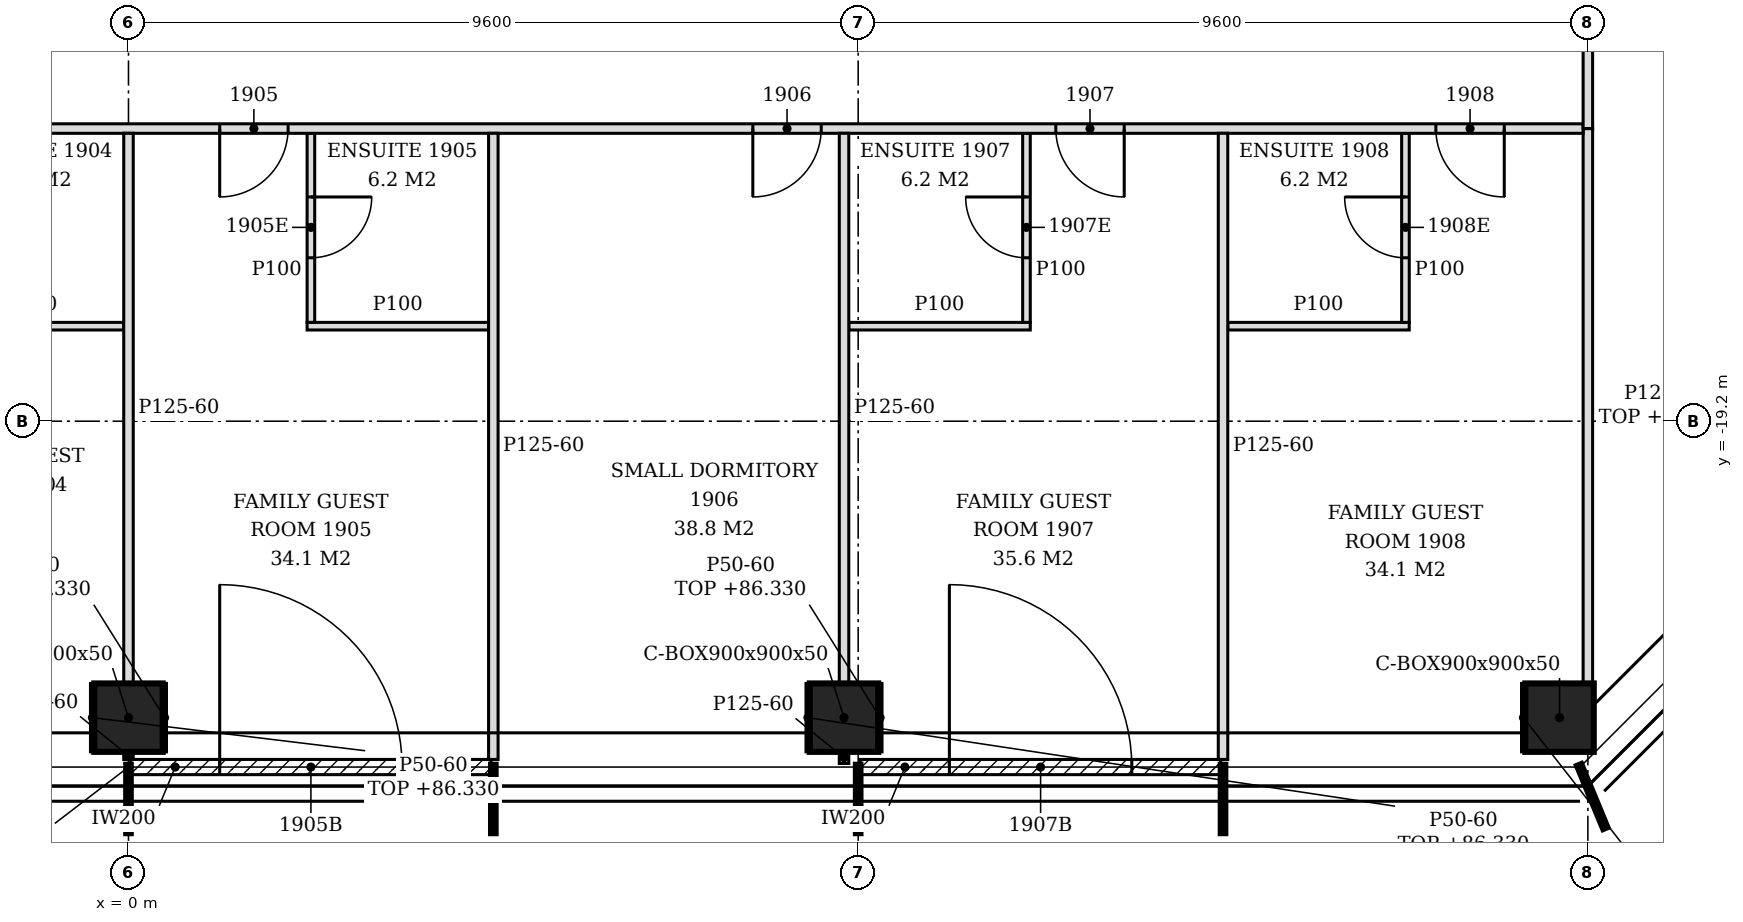
"""IFC4 building model, lengths in metres.
Left out: names, types, materials, properties, quantities, classifications, styles, units other than length and angle.
Written with IfcOpenShell. Run it as: python <this file> out.ifc"""

import sys

from ifc_helpers import new_model, si_unit, direction, frame, frame_2d, origin, origin_2d, place, context, subcontext, project, spatial, polyline, rectangle, hollow_rectangle, outline, extrude, clip, halfspace, element, fill, save


model = new_model("IFC4")
c1 = context("Model", 3, precision=1e-05, world=origin(), true_north=direction((0.0, 1.0)))
c2 = subcontext(c1, "Body", "Model", "MODEL_VIEW")
j1 = project(units=[si_unit("LENGTHUNIT", "METRE"), si_unit("PLANEANGLEUNIT", "RADIAN")], contexts=[c1])
p1 = place(None, origin())
s1 = spatial("IfcSite", under=j1, at=p1, CompositionType="ELEMENT")
p2 = place(p1, origin())
s2 = spatial("IfcBuilding", under=s1, at=p2, CompositionType="ELEMENT")
p3 = place(p2, frame((0.0, 0.0, 83.4)))
s3 = spatial("IfcBuildingStorey", under=s2, at=p3, CompositionType="ELEMENT", Elevation=83.4)
for number, where, z_axis, x_axis in (
    (1, (0.0, -23.1, -0.15), (0.0, 0.0, 1.0), (1.0, 0.0, 0.0)),
    (2, (9.414, -23.1, -0.15), (0.0, 0.0, 1.0), (1.0, 0.0, 0.0)),
    (3, (18.827, -23.1, -0.15), (0.0, 0.0, 1.0), (1.0, 0.0, 0.0)),
):
    element("IfcColumn", number, at=place(p3, frame(where, z_axis=z_axis, x_axis=x_axis)), inside=s3, PredefinedType="COLUMN", context=c2, shape_type="Clipping", body=[
        clip(extrude(hollow_rectangle(XDim=0.9, YDim=0.9, WallThickness=0.05, at=origin_2d()), origin(), (0.0, 0.0, 1.0), 3.6), halfspace(frame((0.0, 0.0, 3.576), z_axis=(0.0, 0.0, 1.0), x_axis=(1.0, 0.0, 0.0)), False)),
    ])
p4 = place(p3, frame((0.03, -23.75, 0.0), z_axis=(0.0, 0.0, 1.0), x_axis=(1.0, 0.0, 0.0)))
e4 = element("IfcWall", 4, at=p4, inside=s3, PredefinedType="NOTDEFINED", context=c2, shape_type="SweptSolid", body=[
    extrude(rectangle(XDim=4.74, YDim=0.2, at=frame_2d((2.37, 0.0))), origin(), (0.0, 0.0, 1.0), 3.45),
])
p5 = place(p4, frame((1.17, 0.0, 0.0)))
e5 = element("IfcOpeningElement", 5, at=p5, cuts=e4, PredefinedType="OPENING", context=c2, shape_type="SweptSolid", body=[
    extrude(rectangle(XDim=2.4, YDim=2.4, at=frame_2d((1.2, 1.2))), frame((0.0, 0.11, 0.0), z_axis=(0.0, -1.0, 0.0), x_axis=(1.0, 0.0, 0.0)), (0.0, 0.0, 1.0), 0.22),
])
p6 = place(p3, frame((9.63, -23.75, 0.0), z_axis=(0.0, 0.0, 1.0), x_axis=(1.0, 0.0, 0.0)))
e6 = element("IfcWall", 6, at=p6, inside=s3, PredefinedType="NOTDEFINED", context=c2, shape_type="SweptSolid", body=[
    extrude(rectangle(XDim=4.74, YDim=0.2, at=frame_2d((2.37, 0.0))), origin(), (0.0, 0.0, 1.0), 3.45),
])
p7 = place(p6, frame((1.17, 0.0, 0.0)))
e7 = element("IfcOpeningElement", 7, at=p7, cuts=e6, PredefinedType="OPENING", context=c2, shape_type="SweptSolid", body=[
    extrude(rectangle(XDim=2.4, YDim=2.4, at=frame_2d((1.2, 1.2))), frame((0.0, 0.11, 0.0), z_axis=(0.0, -1.0, 0.0), x_axis=(1.0, 0.0, 0.0)), (0.0, 0.0, 1.0), 0.22),
])
p8 = place(p3, frame((0.0, -23.65, 0.0), z_axis=(0.0, 0.0, 1.0), x_axis=(0.0, 1.0, 0.0)))
e8 = element("IfcWall", 8, at=p8, inside=s3, PredefinedType="PARTITIONING", context=c2, shape_type="SweptSolid", body=[
    extrude(rectangle(XDim=0.1, YDim=0.125, at=frame_2d((0.05, 0.0))), origin(), (0.0, 0.0, 1.0), 3.45),
])
p9 = place(p3, frame((4.8, -23.65, 0.0), z_axis=(0.0, 0.0, 1.0), x_axis=(0.0, 1.0, 0.0)))
e9 = element("IfcWall", 9, at=p9, inside=s3, PredefinedType="PARTITIONING", context=c2, shape_type="SweptSolid", body=[
    extrude(outline(polyline([(0.0, 0.0), (8.237, 0.0), (8.238, 3.45), (4.555, 3.45), (4.553, 2.88), (4.345, 2.88), (4.343, 3.45), (0.7, 3.45), (0.698, 2.93), (0.4, 2.93), (0.398, 3.45), (0.0, 3.45), (0.0, 0.0)])), frame((0.0, 0.062, 0.0), z_axis=(0.0, -1.0, 0.0), x_axis=(1.0, 0.0, 0.0)), (0.0, 0.0, 1.0), 0.125),
])
p10 = place(p3, frame((9.414, -23.703, 0.0), z_axis=(0.0, 0.0, 1.0), x_axis=(0.0, 1.0, 0.0)))
e10 = element("IfcWall", 10, at=p10, inside=s3, PredefinedType="PARTITIONING", context=c2, shape_type="SweptSolid", body=[
    extrude(rectangle(XDim=0.153, YDim=0.125, at=frame_2d((0.076, 0.0))), origin(), (0.0, 0.0, 1.0), 3.45),
])
p11 = place(p3, frame((14.4, -23.65, 0.0), z_axis=(0.0, 0.0, 1.0), x_axis=(0.0, 1.0, 0.0)))
e11 = element("IfcWall", 11, at=p11, inside=s3, PredefinedType="PARTITIONING", context=c2, shape_type="SweptSolid", body=[
    extrude(outline(polyline([(0.0, 0.0), (8.237, 0.0), (8.238, 3.45), (4.555, 3.45), (4.553, 2.88), (4.345, 2.88), (4.343, 3.45), (0.7, 3.45), (0.698, 2.93), (0.4, 2.93), (0.398, 3.45), (0.0, 3.45), (0.0, 0.0)])), frame((0.0, 0.062, 0.0), z_axis=(0.0, -1.0, 0.0), x_axis=(1.0, 0.0, 0.0)), (0.0, 0.0, 1.0), 0.125),
])
for number, where, z_axis, x_axis in (
    (12, (0.0, -22.65, 0.0), (0.0, 0.0, 1.0), (0.0, 1.0, 0.0)),
    (13, (9.414, -22.65, 0.0), (0.0, 0.0, 1.0), (0.0, 1.0, 0.0)),
):
    element("IfcWall", number, at=place(p3, frame(where, z_axis=z_axis, x_axis=x_axis)), inside=s3, PredefinedType="PARTITIONING", context=c2, shape_type="SweptSolid", body=[
        extrude(outline(polyline([(0.0, 0.0), (7.237, 0.0), (7.238, 3.45), (3.555, 3.45), (3.553, 2.88), (3.345, 2.88), (3.343, 3.45), (0.0, 3.45), (0.0, 0.0)])), frame((0.0, 0.062, 0.0), z_axis=(0.0, -1.0, 0.0), x_axis=(1.0, 0.0, 0.0)), (0.0, 0.0, 1.0), 0.125),
    ])
p12 = place(p3, frame((19.2, -22.65, 0.0), z_axis=(0.0, 0.0, 1.0), x_axis=(0.0, 1.0, 0.0)))
e14 = element("IfcWall", 14, at=p12, inside=s3, PredefinedType="PARTITIONING", context=c2, shape_type="SweptSolid", body=[
    extrude(outline(polyline([(0.0, 0.0), (7.3, 0.0), (7.3, 2.73), (0.48, 2.73), (0.478, 2.63), (0.0, 2.63), (0.0, 0.0)])), frame((0.0, 0.062, 0.0), z_axis=(0.0, -1.0, 0.0), x_axis=(1.0, 0.0, 0.0)), (0.0, 0.0, 1.0), 0.125),
])
for number, where, z_axis, x_axis in (
    (15, (-2.45, -17.95, 0.0), (0.0, 0.0, 1.0), (1.0, 0.0, 0.0)),
    (16, (2.35, -17.95, 0.0), (0.0, 0.0, 1.0), (1.0, 0.0, 0.0)),
):
    element("IfcWall", number, at=place(p3, frame(where, z_axis=z_axis, x_axis=x_axis)), inside=s3, PredefinedType="PARTITIONING", context=c2, shape_type="SweptSolid", body=[
        extrude(rectangle(XDim=2.387, YDim=0.1, at=frame_2d((1.194, 0.0))), origin(), (0.0, 0.0, 1.0), 3.45),
    ])
p13 = place(p3, frame((2.4, -17.9, 0.0), z_axis=(0.0, 0.0, 1.0), x_axis=(0.0, 1.0, 0.0)))
e17 = element("IfcWall", 17, at=p13, inside=s3, PredefinedType="PARTITIONING", context=c2, shape_type="SweptSolid", body=[
    extrude(rectangle(XDim=2.487, YDim=0.1, at=frame_2d((1.244, 0.0))), origin(), (0.0, 0.0, 1.0), 3.45),
])
p14 = place(p13, frame((0.85, 0.0, 0.0)))
e18 = element("IfcOpeningElement", 18, at=p14, cuts=e17, PredefinedType="OPENING", context=c2, shape_type="SweptSolid", body=[
    extrude(rectangle(XDim=0.8, YDim=2.1, at=frame_2d((0.4, 1.05))), frame((0.0, 0.06, 0.0), z_axis=(0.0, -1.0, 0.0), x_axis=(1.0, 0.0, 0.0)), (0.0, 0.0, 1.0), 0.12),
])
p15 = place(p3, frame((9.477, -17.95, 0.0), z_axis=(0.0, 0.0, 1.0), x_axis=(1.0, 0.0, 0.0)))
e19 = element("IfcWall", 19, at=p15, inside=s3, PredefinedType="PARTITIONING", context=c2, shape_type="SweptSolid", body=[
    extrude(rectangle(XDim=2.387, YDim=0.1, at=frame_2d((1.194, 0.0))), origin(), (0.0, 0.0, 1.0), 3.45),
])
p16 = place(p3, frame((11.814, -17.9, 0.0), z_axis=(0.0, 0.0, 1.0), x_axis=(0.0, 1.0, 0.0)))
e20 = element("IfcWall", 20, at=p16, inside=s3, PredefinedType="PARTITIONING", context=c2, shape_type="SweptSolid", body=[
    extrude(rectangle(XDim=2.487, YDim=0.1, at=frame_2d((1.244, 0.0))), origin(), (0.0, 0.0, 1.0), 3.45),
])
p17 = place(p16, frame((0.85, 0.0, 0.0)))
e21 = element("IfcOpeningElement", 21, at=p17, cuts=e20, PredefinedType="OPENING", context=c2, shape_type="SweptSolid", body=[
    extrude(rectangle(XDim=0.8, YDim=2.1, at=frame_2d((0.4, 1.05))), frame((0.0, 0.06, 0.0), z_axis=(0.0, -1.0, 0.0), x_axis=(1.0, 0.0, 0.0)), (0.0, 0.0, 1.0), 0.12),
])
p18 = place(p3, frame((14.462, -17.95, 0.0), z_axis=(0.0, 0.0, 1.0), x_axis=(1.0, 0.0, 0.0)))
e22 = element("IfcWall", 22, at=p18, inside=s3, PredefinedType="PARTITIONING", context=c2, shape_type="SweptSolid", body=[
    extrude(rectangle(XDim=2.388, YDim=0.1, at=frame_2d((1.194, 0.0))), origin(), (0.0, 0.0, 1.0), 3.45),
])
p19 = place(p3, frame((16.8, -17.9, 0.0), z_axis=(0.0, 0.0, 1.0), x_axis=(0.0, 1.0, 0.0)))
e23 = element("IfcWall", 23, at=p19, inside=s3, PredefinedType="PARTITIONING", context=c2, shape_type="SweptSolid", body=[
    extrude(rectangle(XDim=2.487, YDim=0.1, at=frame_2d((1.244, 0.0))), origin(), (0.0, 0.0, 1.0), 3.45),
])
p20 = place(p19, frame((0.85, 0.0, 0.0)))
e24 = element("IfcOpeningElement", 24, at=p20, cuts=e23, PredefinedType="OPENING", context=c2, shape_type="SweptSolid", body=[
    extrude(rectangle(XDim=0.8, YDim=2.1, at=frame_2d((0.4, 1.05))), frame((0.0, 0.06, 0.0), z_axis=(0.0, -1.0, 0.0), x_axis=(1.0, 0.0, 0.0)), (0.0, 0.0, 1.0), 0.12),
])
p21 = place(p3, frame((-22.75, -15.35, 0.0), z_axis=(0.0, 0.0, 1.0), x_axis=(1.0, 0.0, 0.0)))
e25 = element("IfcWall", 25, at=p21, inside=s3, PredefinedType="PARTITIONING", context=c2, shape_type="SweptSolid", body=[
    extrude(outline(polyline([(0.0, 0.0), (41.887, 0.0), (41.887, 2.73), (41.8, 2.73), (41.798, 3.45), (30.1, 3.45), (30.098, 2.73), (29.8, 2.73), (29.798, 3.45), (18.1, 3.45), (18.098, 2.73), (17.8, 2.73), (17.798, 3.45), (8.5, 3.45), (8.498, 2.93), (8.2, 2.93), (8.198, 3.45), (0.0, 3.45), (0.0, 0.0)])), frame((0.0, 0.062, 0.0), z_axis=(0.0, -1.0, 0.0), x_axis=(1.0, 0.0, 0.0)), (0.0, 0.0, 1.0), 0.125),
])
p22 = place(p21, frame((7.15, 0.0, 0.0)))
e26 = element("IfcOpeningElement", 26, at=p22, cuts=e25, PredefinedType="OPENING", context=c2, shape_type="SweptSolid", body=[
    extrude(rectangle(XDim=0.9, YDim=2.1, at=frame_2d((0.45, 1.05))), frame((0.0, 0.073, 0.0), z_axis=(0.0, -1.0, 0.0), x_axis=(1.0, 0.0, 0.0)), (0.0, 0.0, 1.0), 0.145),
])
p23 = place(p21, frame((9.736, 0.0, 0.0)))
e27 = element("IfcOpeningElement", 27, at=p23, cuts=e25, PredefinedType="OPENING", context=c2, shape_type="SweptSolid", body=[
    extrude(rectangle(XDim=0.9, YDim=2.1, at=frame_2d((0.45, 1.05))), frame((0.0, 0.073, 0.0), z_axis=(0.0, -1.0, 0.0), x_axis=(1.0, 0.0, 0.0)), (0.0, 0.0, 1.0), 0.145),
])
p24 = place(p21, frame((16.75, 0.0, 0.0)))
e28 = element("IfcOpeningElement", 28, at=p24, cuts=e25, PredefinedType="OPENING", context=c2, shape_type="SweptSolid", body=[
    extrude(rectangle(XDim=0.9, YDim=2.1, at=frame_2d((0.45, 1.05))), frame((0.0, 0.073, 0.0), z_axis=(0.0, -1.0, 0.0), x_axis=(1.0, 0.0, 0.0)), (0.0, 0.0, 1.0), 0.145),
])
p25 = place(p21, frame((19.15, 0.0, 0.0)))
e29 = element("IfcOpeningElement", 29, at=p25, cuts=e25, PredefinedType="OPENING", context=c2, shape_type="SweptSolid", body=[
    extrude(rectangle(XDim=0.9, YDim=2.1, at=frame_2d((0.45, 1.05))), frame((0.0, 0.073, 0.0), z_axis=(0.0, -1.0, 0.0), x_axis=(1.0, 0.0, 0.0)), (0.0, 0.0, 1.0), 0.145),
])
p26 = place(p21, frame((23.95, 0.0, 0.0)))
e30 = element("IfcOpeningElement", 30, at=p26, cuts=e25, PredefinedType="OPENING", context=c2, shape_type="SweptSolid", body=[
    extrude(rectangle(XDim=0.9, YDim=2.1, at=frame_2d((0.45, 1.05))), frame((0.0, 0.073, 0.0), z_axis=(0.0, -1.0, 0.0), x_axis=(1.0, 0.0, 0.0)), (0.0, 0.0, 1.0), 0.145),
])
p27 = place(p21, frame((30.964, 0.0, 0.0)))
e31 = element("IfcOpeningElement", 31, at=p27, cuts=e25, PredefinedType="OPENING", context=c2, shape_type="SweptSolid", body=[
    extrude(rectangle(XDim=0.9, YDim=2.1, at=frame_2d((0.45, 1.05))), frame((0.0, 0.073, 0.0), z_axis=(0.0, -1.0, 0.0), x_axis=(1.0, 0.0, 0.0)), (0.0, 0.0, 1.0), 0.145),
])
p28 = place(p21, frame((34.95, 0.0, 0.0)))
e32 = element("IfcOpeningElement", 32, at=p28, cuts=e25, PredefinedType="OPENING", context=c2, shape_type="SweptSolid", body=[
    extrude(rectangle(XDim=0.9, YDim=2.1, at=frame_2d((0.45, 1.05))), frame((0.0, 0.073, 0.0), z_axis=(0.0, -1.0, 0.0), x_axis=(1.0, 0.0, 0.0)), (0.0, 0.0, 1.0), 0.145),
])
p29 = place(p21, frame((39.95, 0.0, 0.0)))
e33 = element("IfcOpeningElement", 33, at=p29, cuts=e25, PredefinedType="OPENING", context=c2, shape_type="SweptSolid", body=[
    extrude(rectangle(XDim=0.9, YDim=2.1, at=frame_2d((0.45, 1.05))), frame((0.0, 0.073, 0.0), z_axis=(0.0, -1.0, 0.0), x_axis=(1.0, 0.0, 0.0)), (0.0, 0.0, 1.0), 0.145),
])
p30 = place(p3, frame((19.2, -15.35, 0.0), z_axis=(0.0, 0.0, 1.0), x_axis=(0.0, 1.0, 0.0)))
e34 = element("IfcWall", 34, at=p30, inside=s3, PredefinedType="PARTITIONING", context=c2, shape_type="SweptSolid", body=[
    extrude(rectangle(XDim=6.713, YDim=0.125, at=frame_2d((3.356, 0.0))), origin(), (0.0, 0.0, 1.0), 2.73),
])
p31 = place(p30, frame((4.55, 0.0, 0.0)))
e35 = element("IfcOpeningElement", 35, at=p31, cuts=e34, PredefinedType="OPENING", context=c2, shape_type="SweptSolid", body=[
    extrude(rectangle(XDim=0.9, YDim=2.1, at=frame_2d((0.45, 1.05))), frame((0.0, 0.073, 0.0), z_axis=(0.0, -1.0, 0.0), x_axis=(1.0, 0.0, 0.0)), (0.0, 0.0, 1.0), 0.145),
])
for number, where, z_axis, x_axis in (
    (36, (-0.475, -23.55, 0.0), (0.0, 0.0, 1.0), (0.0, 1.0, 0.0)),
    (37, (0.475, -23.55, 0.0), (0.0, 0.0, 1.0), (0.0, 1.0, 0.0)),
    (38, (8.939, -23.55, 0.0), (0.0, 0.0, 1.0), (0.0, 1.0, 0.0)),
    (39, (9.889, -23.55, 0.0), (0.0, 0.0, 1.0), (0.0, 1.0, 0.0)),
    (40, (18.352, -23.55, 0.0), (0.0, 0.0, 1.0), (0.0, 1.0, 0.0)),
):
    element("IfcWall", number, at=place(p3, frame(where, z_axis=z_axis, x_axis=x_axis)), inside=s3, PredefinedType="PARTITIONING", context=c2, shape_type="SweptSolid", body=[
        extrude(rectangle(XDim=0.9, YDim=0.05, at=frame_2d((0.45, 0.0))), origin(), (0.0, 0.0, 1.0), 2.93),
    ])
p32 = place(p5, origin())
e41 = element("IfcDoor", 41, at=p32, inside=s3, OperationType="SINGLE_SWING_LEFT", PredefinedType="DOOR", context=c2, shape_type="SweptSolid", body=[
    extrude(rectangle(XDim=2.4, YDim=2.4, at=frame_2d((1.2, 1.2))), frame((0.0, 0.025, 0.0), z_axis=(0.0, -1.0, 0.0), x_axis=(1.0, 0.0, 0.0)), (0.0, 0.0, 1.0), 0.05),
])
fill(e5, e41)
p33 = place(p7, origin())
e42 = element("IfcDoor", 42, at=p33, inside=s3, OperationType="SINGLE_SWING_LEFT", PredefinedType="DOOR", context=c2, shape_type="SweptSolid", body=[
    extrude(rectangle(XDim=2.4, YDim=2.4, at=frame_2d((1.2, 1.2))), frame((0.0, 0.025, 0.0), z_axis=(0.0, -1.0, 0.0), x_axis=(1.0, 0.0, 0.0)), (0.0, 0.0, 1.0), 0.05),
])
fill(e7, e42)
p34 = place(p26, frame((0.9, 0.0, 0.0), z_axis=(0.0, 0.0, 1.0), x_axis=(-1.0, 0.0, 0.0)))
e43 = element("IfcDoor", 43, at=p34, inside=s3, OperationType="SINGLE_SWING_RIGHT", PredefinedType="DOOR", context=c2, shape_type="SweptSolid", body=[
    extrude(rectangle(XDim=0.9, YDim=2.1, at=frame_2d((0.45, 1.05))), frame((0.0, 0.025, 0.0), z_axis=(0.0, -1.0, 0.0), x_axis=(1.0, 0.0, 0.0)), (0.0, 0.0, 1.0), 0.05),
])
fill(e30, e43)
p35 = place(p14, frame((0.8, 0.0, 0.0), z_axis=(0.0, 0.0, 1.0), x_axis=(-1.0, 0.0, 0.0)))
e44 = element("IfcDoor", 44, at=p35, inside=s3, OperationType="SINGLE_SWING_LEFT", PredefinedType="DOOR", context=c2, shape_type="SweptSolid", body=[
    extrude(rectangle(XDim=0.8, YDim=2.1, at=frame_2d((0.4, 1.05))), frame((0.0, 0.025, 0.0), z_axis=(0.0, -1.0, 0.0), x_axis=(1.0, 0.0, 0.0)), (0.0, 0.0, 1.0), 0.05),
])
fill(e18, e44)
p36 = place(p27, frame((0.9, 0.0, 0.0), z_axis=(0.0, 0.0, 1.0), x_axis=(-1.0, 0.0, 0.0)))
e45 = element("IfcDoor", 45, at=p36, inside=s3, OperationType="SINGLE_SWING_RIGHT", PredefinedType="DOOR", context=c2, shape_type="SweptSolid", body=[
    extrude(rectangle(XDim=0.9, YDim=2.1, at=frame_2d((0.45, 1.05))), frame((0.0, 0.025, 0.0), z_axis=(0.0, -1.0, 0.0), x_axis=(1.0, 0.0, 0.0)), (0.0, 0.0, 1.0), 0.05),
])
fill(e31, e45)
p37 = place(p28, frame((0.9, 0.0, 0.0), z_axis=(0.0, 0.0, 1.0), x_axis=(-1.0, 0.0, 0.0)))
e46 = element("IfcDoor", 46, at=p37, inside=s3, OperationType="SINGLE_SWING_LEFT", PredefinedType="DOOR", context=c2, shape_type="SweptSolid", body=[
    extrude(rectangle(XDim=0.9, YDim=2.1, at=frame_2d((0.45, 1.05))), frame((0.0, 0.025, 0.0), z_axis=(0.0, -1.0, 0.0), x_axis=(1.0, 0.0, 0.0)), (0.0, 0.0, 1.0), 0.05),
])
fill(e32, e46)
p38 = place(p17, origin())
e47 = element("IfcDoor", 47, at=p38, inside=s3, OperationType="SINGLE_SWING_RIGHT", PredefinedType="DOOR", context=c2, shape_type="SweptSolid", body=[
    extrude(rectangle(XDim=0.8, YDim=2.1, at=frame_2d((0.4, 1.05))), frame((0.0, 0.025, 0.0), z_axis=(0.0, -1.0, 0.0), x_axis=(1.0, 0.0, 0.0)), (0.0, 0.0, 1.0), 0.05),
])
fill(e21, e47)
p39 = place(p29, frame((0.9, 0.0, 0.0), z_axis=(0.0, 0.0, 1.0), x_axis=(-1.0, 0.0, 0.0)))
e48 = element("IfcDoor", 48, at=p39, inside=s3, OperationType="SINGLE_SWING_LEFT", PredefinedType="DOOR", context=c2, shape_type="SweptSolid", body=[
    extrude(rectangle(XDim=0.9, YDim=2.1, at=frame_2d((0.45, 1.05))), frame((0.0, 0.025, 0.0), z_axis=(0.0, -1.0, 0.0), x_axis=(1.0, 0.0, 0.0)), (0.0, 0.0, 1.0), 0.05),
])
fill(e33, e48)
p40 = place(p20, origin())
e49 = element("IfcDoor", 49, at=p40, inside=s3, OperationType="SINGLE_SWING_RIGHT", PredefinedType="DOOR", context=c2, shape_type="SweptSolid", body=[
    extrude(rectangle(XDim=0.8, YDim=2.1, at=frame_2d((0.4, 1.05))), frame((0.0, 0.025, 0.0), z_axis=(0.0, -1.0, 0.0), x_axis=(1.0, 0.0, 0.0)), (0.0, 0.0, 1.0), 0.05),
])
fill(e24, e49)
save(model, sys.argv[1])
